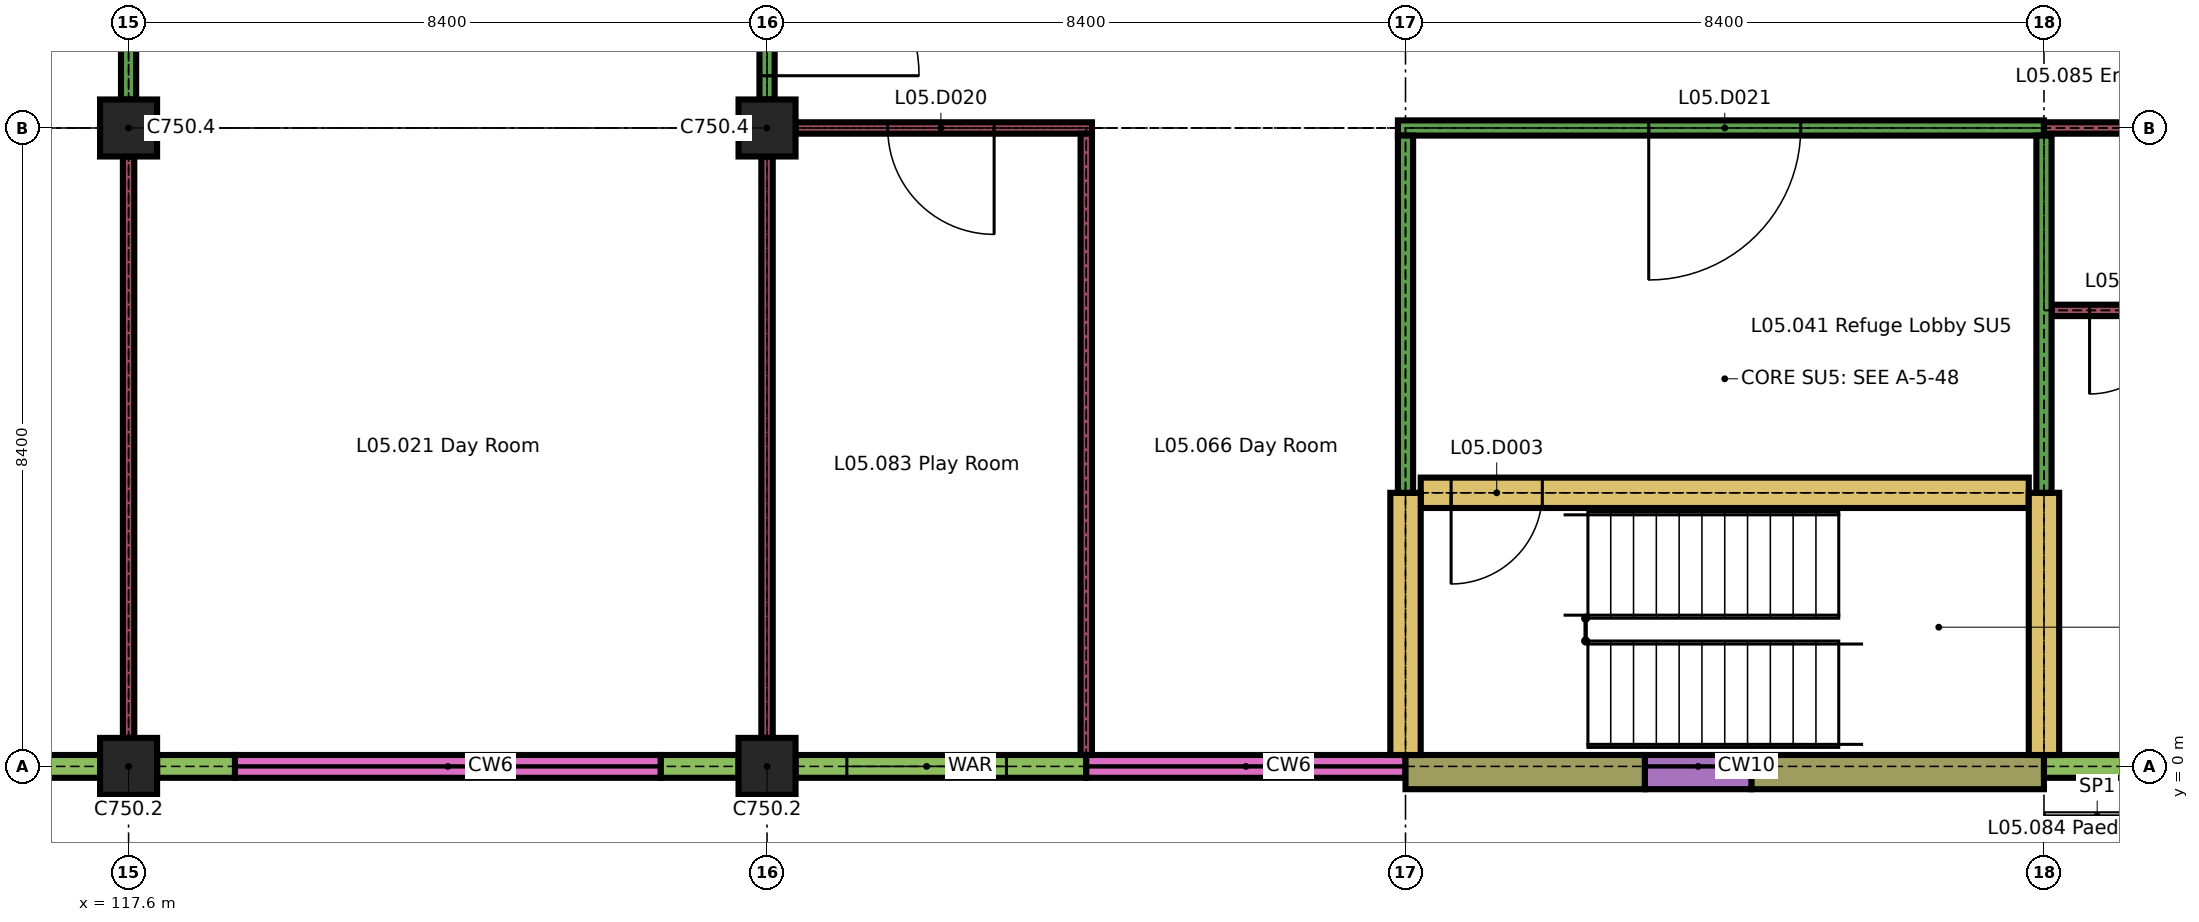
"""IFC4 building model, lengths in metres.
Left out: names, types, materials, properties, quantities, classifications, styles, units other than length and angle.
Written with IfcOpenShell. Run it as: python <this file> out.ifc"""

import sys

from ifc_helpers import new_model, si_unit, direction, frame, frame_2d, origin, origin_2d, place, context, subcontext, project, spatial, rectangle, extrude, element, fill, save


model = new_model("IFC4")
c1 = context("Model", 3, precision=1e-05, world=origin(), true_north=direction((0.0, 1.0)))
c2 = subcontext(c1, "Body", "Model", "MODEL_VIEW")
j1 = project(units=[si_unit("LENGTHUNIT", "METRE"), si_unit("PLANEANGLEUNIT", "RADIAN")], contexts=[c1])
p1 = place(None, origin())
s1 = spatial("IfcSite", under=j1, at=p1, CompositionType="ELEMENT")
p2 = place(p1, origin())
s2 = spatial("IfcBuilding", under=s1, at=p2, CompositionType="ELEMENT")
p3 = place(p2, frame((0.0, 0.0, 22.5)))
s3 = spatial("IfcBuildingStorey", under=s2, at=p3, CompositionType="ELEMENT", Elevation=22.5)
for number, where, z_axis, x_axis in (
    (1, (117.6, 0.0, 0.0), (0.0, 0.0, 1.0), (1.0, 0.0, 0.0)),
    (2, (126.0, 0.0, 0.0), (0.0, 0.0, 1.0), (1.0, 0.0, 0.0)),
    (3, (117.6, 8.4, 0.0), (0.0, 0.0, 1.0), (1.0, 0.0, 0.0)),
    (4, (126.0, 8.4, 0.0), (0.0, 0.0, 1.0), (1.0, 0.0, 0.0)),
):
    element("IfcColumn", number, at=place(p3, frame(where, z_axis=z_axis, x_axis=x_axis)), inside=s3, PredefinedType="COLUMN", context=c2, shape_type="SweptSolid", body=[
        extrude(rectangle(XDim=0.75, YDim=0.75, at=origin_2d()), origin(), (0.0, 0.0, 1.0), 3.26),
    ])
p4 = place(p3, frame((116.1, 0.0, 0.0), z_axis=(0.0, 0.0, 1.0), x_axis=(1.0, 0.0, 0.0)))
e5 = element("IfcWall", 5, at=p4, inside=s3, PredefinedType="SOLIDWALL", context=c2, shape_type="SweptSolid", body=[
    extrude(rectangle(XDim=1.125, YDim=0.3, at=frame_2d((0.562, 0.0))), origin(), (0.0, 0.0, 1.0), 2.96),
])
for number, where, z_axis, x_axis in (
    (6, (117.975, 0.0, 0.0), (0.0, 0.0, 1.0), (1.0, 0.0, 0.0)),
    (7, (124.6, 0.0, 0.0), (0.0, 0.0, 1.0), (1.0, 0.0, 0.0)),
):
    element("IfcWall", number, at=place(p3, frame(where, z_axis=z_axis, x_axis=x_axis)), inside=s3, PredefinedType="SOLIDWALL", context=c2, shape_type="SweptSolid", body=[
        extrude(rectangle(XDim=1.025, YDim=0.3, at=frame_2d((0.512, 0.0))), origin(), (0.0, 0.0, 1.0), 2.96),
    ])
p5 = place(p3, frame((119.0, 0.0, 0.0), z_axis=(0.0, 0.0, 1.0), x_axis=(1.0, 0.0, 0.0)))
e8 = element("IfcWall", 8, at=p5, inside=s3, PredefinedType="SOLIDWALL", context=c2, shape_type="SweptSolid", body=[
    extrude(rectangle(XDim=5.6, YDim=0.3, at=frame_2d((2.8, 0.0))), origin(), (0.0, 0.0, 1.0), 0.6),
])
p6 = place(p3, frame((126.375, 0.0, 0.0), z_axis=(0.0, 0.0, 1.0), x_axis=(1.0, 0.0, 0.0)))
e9 = element("IfcWall", 9, at=p6, inside=s3, PredefinedType="SOLIDWALL", context=c2, shape_type="SweptSolid", body=[
    extrude(rectangle(XDim=3.825, YDim=0.3, at=frame_2d((1.913, 0.0))), origin(), (0.0, 0.0, 1.0), 2.96),
])
p7 = place(p6, frame((0.675, 0.0, 0.9)))
e10 = element("IfcOpeningElement", 10, at=p7, cuts=e9, PredefinedType="OPENING", context=c2, shape_type="SweptSolid", body=[
    extrude(rectangle(XDim=2.1, YDim=1.5, at=frame_2d((1.05, 0.75))), frame((0.0, 0.16, 0.0), z_axis=(0.0, -1.0, 0.0), x_axis=(1.0, 0.0, 0.0)), (0.0, 0.0, 1.0), 0.32),
])
p8 = place(p3, frame((130.2, 0.0, 0.0), z_axis=(0.0, 0.0, 1.0), x_axis=(1.0, 0.0, 0.0)))
e11 = element("IfcWall", 11, at=p8, inside=s3, PredefinedType="SOLIDWALL", context=c2, shape_type="SweptSolid", body=[
    extrude(rectangle(XDim=4.2, YDim=0.3, at=frame_2d((2.1, 0.0))), origin(), (0.0, 0.0, 1.0), 0.6),
])
p9 = place(p3, frame((134.4, -0.075, 0.0), z_axis=(0.0, 0.0, 1.0), x_axis=(1.0, 0.0, 0.0)))
e12 = element("IfcWall", 12, at=p9, inside=s3, PredefinedType="SOLIDWALL", context=c2, shape_type="SweptSolid", body=[
    extrude(rectangle(XDim=3.15, YDim=0.45, at=frame_2d((1.575, 0.0))), origin(), (0.0, 0.0, 1.0), 3.26),
])
p10 = place(p3, frame((138.95, -0.075, 0.0), z_axis=(0.0, 0.0, 1.0), x_axis=(1.0, 0.0, 0.0)))
e13 = element("IfcWall", 13, at=p10, inside=s3, PredefinedType="SOLIDWALL", context=c2, shape_type="SweptSolid", body=[
    extrude(rectangle(XDim=3.85, YDim=0.45, at=frame_2d((1.925, 0.0))), origin(), (0.0, 0.0, 1.0), 3.26),
])
p11 = place(p3, frame((137.55, -0.075, 0.0), z_axis=(0.0, 0.0, 1.0), x_axis=(1.0, 0.0, 0.0)))
e14 = element("IfcWall", 14, at=p11, inside=s3, PredefinedType="SOLIDWALL", context=c2, shape_type="SweptSolid", body=[
    extrude(rectangle(XDim=1.4, YDim=0.45, at=frame_2d((0.7, 0.0))), origin(), (0.0, 0.0, 1.0), 0.6),
])
p12 = place(p3, frame((142.8, 0.0, 0.0), z_axis=(0.0, 0.0, 1.0), x_axis=(1.0, 0.0, 0.0)))
e15 = element("IfcWall", 15, at=p12, inside=s3, PredefinedType="SOLIDWALL", context=c2, shape_type="SweptSolid", body=[
    extrude(rectangle(XDim=4.2, YDim=0.3, at=frame_2d((2.1, 0.0))), origin(), (0.0, 0.0, 1.0), 2.96),
])
p13 = place(p12, frame((1.05, 0.0, 0.9)))
e16 = element("IfcOpeningElement", 16, at=p13, cuts=e15, PredefinedType="OPENING", context=c2, shape_type="SweptSolid", body=[
    extrude(rectangle(XDim=2.1, YDim=1.5, at=frame_2d((1.05, 0.75))), frame((0.0, 0.16, 0.0), z_axis=(0.0, -1.0, 0.0), x_axis=(1.0, 0.0, 0.0)), (0.0, 0.0, 1.0), 0.32),
])
p14 = place(p3, frame((134.6, 3.6, 0.0), z_axis=(0.0, 0.0, 1.0), x_axis=(1.0, 0.0, 0.0)))
e17 = element("IfcWall", 17, at=p14, inside=s3, PredefinedType="SHEAR", context=c2, shape_type="SweptSolid", body=[
    extrude(rectangle(XDim=8.0, YDim=0.4, at=frame_2d((4.0, 0.0))), origin(), (0.0, 0.0, 1.0), 3.26),
])
p15 = place(p14, frame((0.4, 0.0, 0.0)))
e18 = element("IfcOpeningElement", 18, at=p15, cuts=e17, PredefinedType="OPENING", context=c2, shape_type="SweptSolid", body=[
    extrude(rectangle(XDim=1.2, YDim=2.1, at=frame_2d((0.6, 1.05))), frame((0.0, 0.21, 0.0), z_axis=(0.0, -1.0, 0.0), x_axis=(1.0, 0.0, 0.0)), (0.0, 0.0, 1.0), 0.42),
])
p16 = place(p3, frame((142.9, 6.0, 0.0), z_axis=(0.0, 0.0, 1.0), x_axis=(1.0, 0.0, 0.0)))
e19 = element("IfcWall", 19, at=p16, inside=s3, PredefinedType="PARTITIONING", context=c2, shape_type="SweptSolid", body=[
    extrude(rectangle(XDim=2.175, YDim=0.15, at=frame_2d((1.087, 0.0))), origin(), (0.0, 0.0, 1.0), 3.26),
])
p17 = place(p16, frame((0.5, 0.0, 0.0)))
e20 = element("IfcOpeningElement", 20, at=p17, cuts=e19, PredefinedType="OPENING", context=c2, shape_type="SweptSolid", body=[
    extrude(rectangle(XDim=1.1, YDim=2.1, at=frame_2d((0.55, 1.05))), frame((0.0, 0.085, 0.0), z_axis=(0.0, -1.0, 0.0), x_axis=(1.0, 0.0, 0.0)), (0.0, 0.0, 1.0), 0.17),
])
p18 = place(p3, frame((126.375, 8.4, 0.0), z_axis=(0.0, 0.0, 1.0), x_axis=(1.0, 0.0, 0.0)))
e21 = element("IfcWall", 21, at=p18, inside=s3, PredefinedType="PARTITIONING", context=c2, shape_type="SweptSolid", body=[
    extrude(rectangle(XDim=3.9, YDim=0.15, at=frame_2d((1.95, 0.0))), origin(), (0.0, 0.0, 1.0), 3.26),
])
p19 = place(p18, frame((1.212, 0.0, 0.0)))
e22 = element("IfcOpeningElement", 22, at=p19, cuts=e21, PredefinedType="OPENING", context=c2, shape_type="SweptSolid", body=[
    extrude(rectangle(XDim=1.4, YDim=2.1, at=frame_2d((0.7, 1.05))), frame((0.0, 0.085, 0.0), z_axis=(0.0, -1.0, 0.0), x_axis=(1.0, 0.0, 0.0)), (0.0, 0.0, 1.0), 0.17),
])
p20 = place(p3, frame((134.3, 8.4, 0.0), z_axis=(0.0, 0.0, 1.0), x_axis=(1.0, 0.0, 0.0)))
e23 = element("IfcWall", 23, at=p20, inside=s3, PredefinedType="PARTITIONING", context=c2, shape_type="SweptSolid", body=[
    extrude(rectangle(XDim=8.5, YDim=0.2, at=frame_2d((4.25, 0.0))), origin(), (0.0, 0.0, 1.0), 3.26),
])
p21 = place(p20, frame((3.3, 0.0, 0.0)))
e24 = element("IfcOpeningElement", 24, at=p21, cuts=e23, PredefinedType="OPENING", context=c2, shape_type="SweptSolid", body=[
    extrude(rectangle(XDim=2.0, YDim=2.4, at=frame_2d((1.0, 1.2))), frame((0.0, 0.11, 0.0), z_axis=(0.0, -1.0, 0.0), x_axis=(1.0, 0.0, 0.0)), (0.0, 0.0, 1.0), 0.22),
])
p22 = place(p3, frame((142.8, 8.4, 0.0), z_axis=(0.0, 0.0, 1.0), x_axis=(1.0, 0.0, 0.0)))
e25 = element("IfcWall", 25, at=p22, inside=s3, PredefinedType="PARTITIONING", context=c2, shape_type="SweptSolid", body=[
    extrude(rectangle(XDim=8.05, YDim=0.15, at=frame_2d((4.025, 0.0))), origin(), (0.0, 0.0, 1.0), 3.26),
])
p23 = place(p22, frame((2.45, 0.0, 0.0)))
e26 = element("IfcOpeningElement", 26, at=p23, cuts=e25, PredefinedType="OPENING", context=c2, shape_type="SweptSolid", body=[
    extrude(rectangle(XDim=1.5, YDim=2.4, at=frame_2d((0.75, 1.2))), frame((0.0, 0.085, 0.0), z_axis=(0.0, -1.0, 0.0), x_axis=(1.0, 0.0, 0.0)), (0.0, 0.0, 1.0), 0.17),
])
p24 = place(p22, frame((4.45, 0.0, 0.0)))
e27 = element("IfcOpeningElement", 27, at=p24, cuts=e25, PredefinedType="OPENING", context=c2, shape_type="SweptSolid", body=[
    extrude(rectangle(XDim=1.5, YDim=2.4, at=frame_2d((0.75, 1.2))), frame((0.0, 0.085, 0.0), z_axis=(0.0, -1.0, 0.0), x_axis=(1.0, 0.0, 0.0)), (0.0, 0.0, 1.0), 0.17),
])
p25 = place(p3, frame((117.6, 0.375, 0.0), z_axis=(0.0, 0.0, 1.0), x_axis=(0.0, 1.0, 0.0)))
e28 = element("IfcWall", 28, at=p25, inside=s3, PredefinedType="PARTITIONING", context=c2, shape_type="SweptSolid", body=[
    extrude(rectangle(XDim=7.65, YDim=0.15, at=frame_2d((3.825, 0.0))), origin(), (0.0, 0.0, 1.0), 3.26),
])
p26 = place(p3, frame((117.6, 8.775, 0.0), z_axis=(0.0, 0.0, 1.0), x_axis=(0.0, 1.0, 0.0)))
e29 = element("IfcWall", 29, at=p26, inside=s3, PredefinedType="PARTITIONING", context=c2, shape_type="SweptSolid", body=[
    extrude(rectangle(XDim=12.825, YDim=0.2, at=frame_2d((6.413, 0.0))), origin(), (0.0, 0.0, 1.0), 3.26),
])
p27 = place(p26, frame((3.163, 0.0, 0.0)))
e30 = element("IfcOpeningElement", 30, at=p27, cuts=e29, PredefinedType="OPENING", context=c2, shape_type="SweptSolid", body=[
    extrude(rectangle(XDim=1.7, YDim=2.4, at=frame_2d((0.85, 1.2))), frame((0.0, 0.11, 0.0), z_axis=(0.0, -1.0, 0.0), x_axis=(1.0, 0.0, 0.0)), (0.0, 0.0, 1.0), 0.22),
])
p28 = place(p3, frame((126.0, 0.375, 0.0), z_axis=(0.0, 0.0, 1.0), x_axis=(0.0, 1.0, 0.0)))
e31 = element("IfcWall", 31, at=p28, inside=s3, PredefinedType="PARTITIONING", context=c2, shape_type="SweptSolid", body=[
    extrude(rectangle(XDim=7.65, YDim=0.15, at=frame_2d((3.825, 0.0))), origin(), (0.0, 0.0, 1.0), 3.26),
])
p29 = place(p3, frame((126.0, 8.775, 0.0), z_axis=(0.0, 0.0, 1.0), x_axis=(0.0, 1.0, 0.0)))
e32 = element("IfcWall", 32, at=p29, inside=s3, PredefinedType="PARTITIONING", context=c2, shape_type="SweptSolid", body=[
    extrude(rectangle(XDim=7.925, YDim=0.2, at=frame_2d((3.962, 0.0))), origin(), (0.0, 0.0, 1.0), 3.26),
])
p30 = place(p29, frame((0.312, 0.0, 0.0)))
e33 = element("IfcOpeningElement", 33, at=p30, cuts=e32, PredefinedType="OPENING", context=c2, shape_type="SweptSolid", body=[
    extrude(rectangle(XDim=2.0, YDim=2.4, at=frame_2d((1.0, 1.2))), frame((0.0, 0.11, 0.0), z_axis=(0.0, -1.0, 0.0), x_axis=(1.0, 0.0, 0.0)), (0.0, 0.0, 1.0), 0.22),
])
p31 = place(p29, frame((5.475, 0.0, 0.0)))
e34 = element("IfcOpeningElement", 34, at=p31, cuts=e32, PredefinedType="OPENING", context=c2, shape_type="SweptSolid", body=[
    extrude(rectangle(XDim=2.0, YDim=2.4, at=frame_2d((1.0, 1.2))), frame((0.0, 0.11, 0.0), z_axis=(0.0, -1.0, 0.0), x_axis=(1.0, 0.0, 0.0)), (0.0, 0.0, 1.0), 0.22),
])
p32 = place(p3, frame((130.2, 0.15, 0.0), z_axis=(0.0, 0.0, 1.0), x_axis=(0.0, 1.0, 0.0)))
e35 = element("IfcWall", 35, at=p32, inside=s3, PredefinedType="PARTITIONING", context=c2, shape_type="SweptSolid", body=[
    extrude(rectangle(XDim=8.175, YDim=0.15, at=frame_2d((4.087, 0.0))), origin(), (0.0, 0.0, 1.0), 3.26),
])
p33 = place(p3, frame((134.4, 0.15, 0.0), z_axis=(0.0, 0.0, 1.0), x_axis=(0.0, 1.0, 0.0)))
e36 = element("IfcWall", 36, at=p33, inside=s3, PredefinedType="SHEAR", context=c2, shape_type="SweptSolid", body=[
    extrude(rectangle(XDim=3.45, YDim=0.4, at=frame_2d((1.725, 0.0))), origin(), (0.0, 0.0, 1.0), 3.26),
])
p34 = place(p3, frame((134.4, 3.6, 0.0), z_axis=(0.0, 0.0, 1.0), x_axis=(0.0, 1.0, 0.0)))
e37 = element("IfcWall", 37, at=p34, inside=s3, PredefinedType="PARTITIONING", context=c2, shape_type="SweptSolid", body=[
    extrude(rectangle(XDim=4.7, YDim=0.2, at=frame_2d((2.35, 0.0))), origin(), (0.0, 0.0, 1.0), 3.26),
])
p35 = place(p3, frame((142.8, 0.15, 0.0), z_axis=(0.0, 0.0, 1.0), x_axis=(0.0, 1.0, 0.0)))
e38 = element("IfcWall", 38, at=p35, inside=s3, PredefinedType="SHEAR", context=c2, shape_type="SweptSolid", body=[
    extrude(rectangle(XDim=3.45, YDim=0.4, at=frame_2d((1.725, 0.0))), origin(), (0.0, 0.0, 1.0), 3.26),
])
p36 = place(p3, frame((142.8, 3.6, 0.0), z_axis=(0.0, 0.0, 1.0), x_axis=(0.0, 1.0, 0.0)))
e39 = element("IfcWall", 39, at=p36, inside=s3, PredefinedType="PARTITIONING", context=c2, shape_type="SweptSolid", body=[
    extrude(rectangle(XDim=4.7, YDim=0.2, at=frame_2d((2.35, 0.0))), origin(), (0.0, 0.0, 1.0), 3.26),
])
p37 = place(p7, origin())
e40 = element("IfcWindow", 40, at=p37, inside=s3, PartitioningType="DOUBLE_PANEL_VERTICAL", PredefinedType="WINDOW", context=c2, shape_type="SweptSolid", body=[
    extrude(rectangle(XDim=2.1, YDim=1.5, at=frame_2d((1.05, 0.75))), frame((0.0, 0.05, 0.0), z_axis=(0.0, -1.0, 0.0), x_axis=(1.0, 0.0, 0.0)), (0.0, 0.0, 1.0), 0.1),
])
fill(e10, e40)
p38 = place(p15, origin())
e41 = element("IfcDoor", 41, at=p38, inside=s3, OperationType="SINGLE_SWING_LEFT", PredefinedType="DOOR", context=c2, shape_type="SweptSolid", body=[
    extrude(rectangle(XDim=1.2, YDim=2.1, at=frame_2d((0.6, 1.05))), frame((0.0, 0.025, 0.0), z_axis=(0.0, -1.0, 0.0), x_axis=(1.0, 0.0, 0.0)), (0.0, 0.0, 1.0), 0.05),
])
fill(e18, e41)
p39 = place(p17, origin())
e42 = element("IfcDoor", 42, at=p39, inside=s3, OperationType="SINGLE_SWING_LEFT", PredefinedType="DOOR", context=c2, shape_type="SweptSolid", body=[
    extrude(rectangle(XDim=1.1, YDim=2.1, at=frame_2d((0.55, 1.05))), frame((0.0, 0.025, 0.0), z_axis=(0.0, -1.0, 0.0), x_axis=(1.0, 0.0, 0.0)), (0.0, 0.0, 1.0), 0.05),
])
fill(e20, e42)
p40 = place(p19, origin())
e43 = element("IfcDoor", 43, at=p40, inside=s3, OperationType="SINGLE_SWING_RIGHT", PredefinedType="DOOR", context=c2, shape_type="SweptSolid", body=[
    extrude(rectangle(XDim=1.4, YDim=2.1, at=frame_2d((0.7, 1.05))), frame((0.0, 0.025, 0.0), z_axis=(0.0, -1.0, 0.0), x_axis=(1.0, 0.0, 0.0)), (0.0, 0.0, 1.0), 0.05),
])
fill(e22, e43)
p41 = place(p21, origin())
e44 = element("IfcDoor", 44, at=p41, inside=s3, OperationType="SINGLE_SWING_LEFT", PredefinedType="DOOR", context=c2, shape_type="SweptSolid", body=[
    extrude(rectangle(XDim=2.0, YDim=2.4, at=frame_2d((1.0, 1.2))), frame((0.0, 0.03, 0.0), z_axis=(0.0, -1.0, 0.0), x_axis=(1.0, 0.0, 0.0)), (0.0, 0.0, 1.0), 0.06),
])
fill(e24, e44)
p42 = place(p30, origin())
e45 = element("IfcDoor", 45, at=p42, inside=s3, OperationType="SINGLE_SWING_LEFT", PredefinedType="DOOR", context=c2, shape_type="SweptSolid", body=[
    extrude(rectangle(XDim=2.0, YDim=2.4, at=frame_2d((1.0, 1.2))), frame((0.0, 0.03, 0.0), z_axis=(0.0, -1.0, 0.0), x_axis=(1.0, 0.0, 0.0)), (0.0, 0.0, 1.0), 0.06),
])
fill(e33, e45)
save(model, sys.argv[1])
